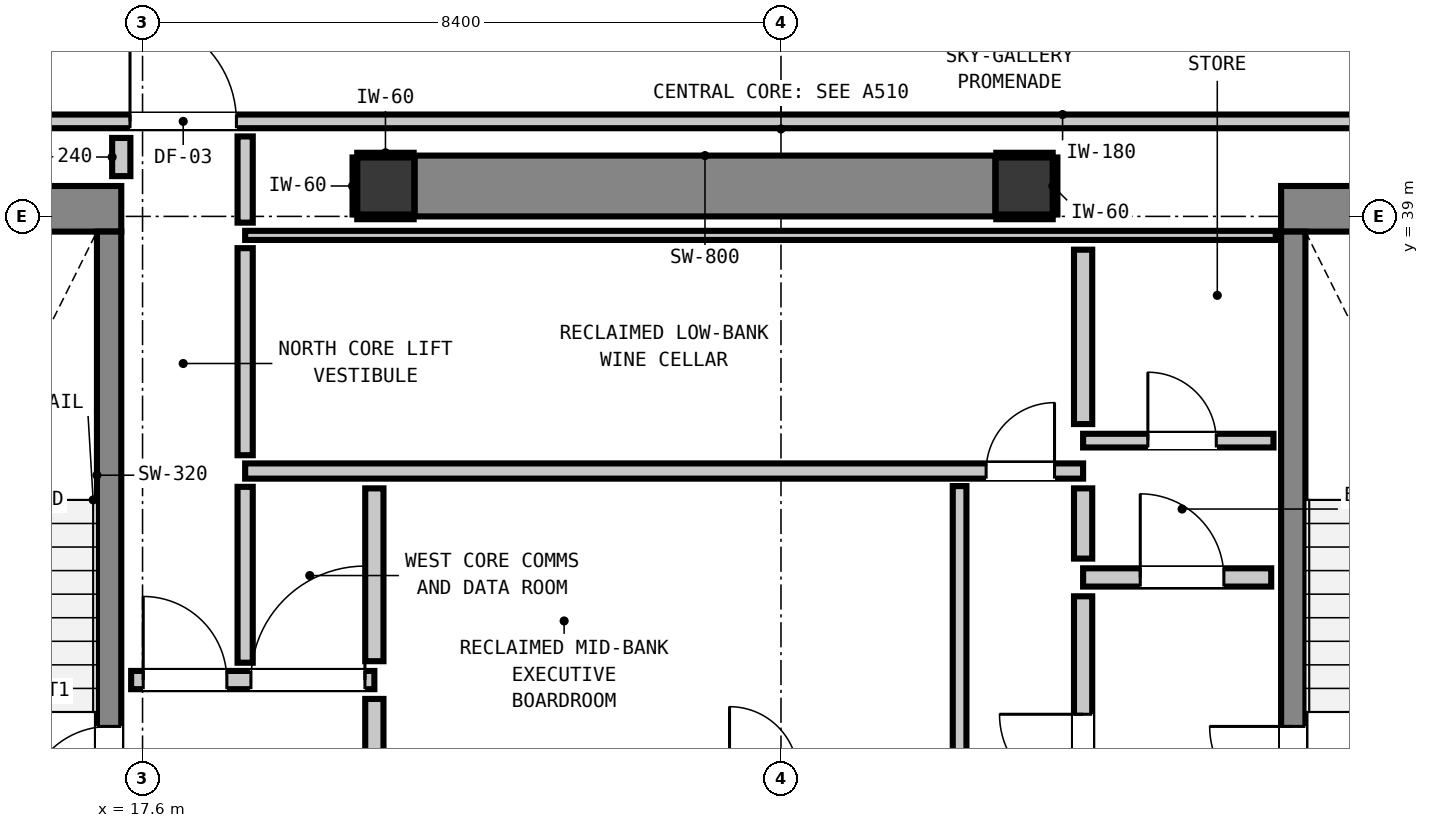
"""IFC4 building model, lengths in metres.
Left out: names, types, materials, properties, quantities, classifications, styles, units other than length and angle.
Written with IfcOpenShell. Run it as: python <this file> out.ifc"""

import sys

from ifc_helpers import new_model, si_unit, direction, frame, frame_2d, origin, origin_2d, place, context, subcontext, project, spatial, rectangle, extrude, element, fill, save


model = new_model("IFC4")
c1 = context("Model", 3, precision=1e-05, world=origin(), true_north=direction((0.0, 1.0)))
c2 = subcontext(c1, "Body", "Model", "MODEL_VIEW")
j1 = project(units=[si_unit("LENGTHUNIT", "METRE"), si_unit("PLANEANGLEUNIT", "RADIAN")], contexts=[c1])
p1 = place(None, origin())
s1 = spatial("IfcSite", under=j1, at=p1, CompositionType="ELEMENT")
p2 = place(p1, origin())
s2 = spatial("IfcBuilding", under=s1, at=p2, CompositionType="ELEMENT")
p3 = place(p2, frame((0.0, 0.0, 231.28)))
s3 = spatial("IfcBuildingStorey", under=s2, at=p3, CompositionType="ELEMENT", Elevation=231.28)
for number, where, z_axis, x_axis in (
    (1, (20.8, 39.4, 0.0), (0.0, 0.0, 1.0), (1.0, 0.0, 0.0)),
    (2, (29.2, 39.4, 0.0), (0.0, 0.0, 1.0), (1.0, 0.0, 0.0)),
):
    element("IfcColumn", number, at=place(p3, frame(where, z_axis=z_axis, x_axis=x_axis)), inside=s3, PredefinedType="COLUMN", context=c2, shape_type="SweptSolid", body=[
        extrude(rectangle(XDim=0.75, YDim=0.75, at=origin_2d()), origin(), (0.0, 0.0, 1.0), 3.32),
    ])
p4 = place(p3, frame((13.24, 39.1, 0.0), z_axis=(0.0, 0.0, 1.0), x_axis=(1.0, 0.0, 0.0)))
e3 = element("IfcWall", 3, at=p4, inside=s3, PredefinedType="SHEAR", context=c2, shape_type="SweptSolid", body=[
    extrude(rectangle(XDim=4.08, YDim=0.6, at=frame_2d((2.04, 0.0))), origin(), (0.0, 0.0, 1.0), 3.32),
])
p5 = place(p3, frame((32.58, 39.1, 0.0), z_axis=(0.0, 0.0, 1.0), x_axis=(1.0, 0.0, 0.0)))
e4 = element("IfcWall", 4, at=p5, inside=s3, PredefinedType="SHEAR", context=c2, shape_type="SweptSolid", body=[
    extrude(rectangle(XDim=4.08, YDim=0.6, at=frame_2d((2.04, 0.0))), origin(), (0.0, 0.0, 1.0), 3.32),
])
p6 = place(p3, frame((21.18, 39.4, 0.0), z_axis=(0.0, 0.0, 1.0), x_axis=(1.0, 0.0, 0.0)))
e5 = element("IfcWall", 5, at=p6, inside=s3, PredefinedType="SHEAR", context=c2, shape_type="SweptSolid", body=[
    extrude(rectangle(XDim=7.64, YDim=0.8, at=frame_2d((3.82, 0.0))), origin(), (0.0, 0.0, 1.0), 3.32),
])
p7 = place(p3, frame((17.16, 31.0, 0.0), z_axis=(0.0, 0.0, 1.0), x_axis=(0.0, 1.0, 0.0)))
e6 = element("IfcWall", 6, at=p7, inside=s3, PredefinedType="SHEAR", context=c2, shape_type="SweptSolid", body=[
    extrude(rectangle(XDim=7.8, YDim=0.32, at=frame_2d((3.9, 0.0))), origin(), (0.0, 0.0, 1.0), 3.32),
])
p8 = place(p7, frame((0.19, 0.0, 0.0)))
e7 = element("IfcOpeningElement", 7, at=p8, cuts=e6, PredefinedType="OPENING", context=c2, shape_type="SweptSolid", body=[
    extrude(rectangle(XDim=1.1, YDim=2.15, at=frame_2d((0.55, 1.075))), frame((0.0, 0.17, 0.0), z_axis=(0.0, -1.0, 0.0), x_axis=(1.0, 0.0, 0.0)), (0.0, 0.0, 1.0), 0.34),
])
p9 = place(p3, frame((32.74, 31.0, 0.0), z_axis=(0.0, 0.0, 1.0), x_axis=(0.0, 1.0, 0.0)))
e8 = element("IfcWall", 8, at=p9, inside=s3, PredefinedType="SHEAR", context=c2, shape_type="SweptSolid", body=[
    extrude(rectangle(XDim=7.8, YDim=0.32, at=frame_2d((3.9, 0.0))), origin(), (0.0, 0.0, 1.0), 3.32),
])
p10 = place(p9, frame((0.19, 0.0, 0.0)))
e9 = element("IfcOpeningElement", 9, at=p10, cuts=e8, PredefinedType="OPENING", context=c2, shape_type="SweptSolid", body=[
    extrude(rectangle(XDim=1.1, YDim=2.15, at=frame_2d((0.55, 1.075))), frame((0.0, 0.17, 0.0), z_axis=(0.0, -1.0, 0.0), x_axis=(1.0, 0.0, 0.0)), (0.0, 0.0, 1.0), 0.34),
])
p11 = place(p3, frame((17.45, 32.9, 0.0), z_axis=(0.0, 0.0, 1.0), x_axis=(1.0, 0.0, 0.0)))
e10 = element("IfcWall", 10, at=p11, inside=s3, PredefinedType="PARTITIONING", context=c2, shape_type="SweptSolid", body=[
    extrude(rectangle(XDim=3.2, YDim=0.24, at=frame_2d((1.6, 0.0))), origin(), (0.0, 0.0, 1.0), 3.1),
])
p12 = place(p11, frame((0.159, 0.0, 0.0)))
e11 = element("IfcOpeningElement", 11, at=p12, cuts=e10, PredefinedType="OPENING", context=c2, shape_type="SweptSolid", body=[
    extrude(rectangle(XDim=1.1, YDim=2.15, at=frame_2d((0.55, 1.075))), frame((0.0, 0.13, 0.0), z_axis=(0.0, -1.0, 0.0), x_axis=(1.0, 0.0, 0.0)), (0.0, 0.0, 1.0), 0.26),
])
p13 = place(p11, frame((1.576, 0.0, 0.0)))
e12 = element("IfcOpeningElement", 12, at=p13, cuts=e10, PredefinedType="OPENING", context=c2, shape_type="SweptSolid", body=[
    extrude(rectangle(XDim=1.5, YDim=2.15, at=frame_2d((0.75, 1.075))), frame((0.0, 0.13, 0.0), z_axis=(0.0, -1.0, 0.0), x_axis=(1.0, 0.0, 0.0)), (0.0, 0.0, 1.0), 0.26),
])
p14 = place(p3, frame((29.975, 34.25, 0.0), z_axis=(0.0, 0.0, 1.0), x_axis=(1.0, 0.0, 0.0)))
e13 = element("IfcWall", 13, at=p14, inside=s3, PredefinedType="PARTITIONING", context=c2, shape_type="SweptSolid", body=[
    extrude(rectangle(XDim=2.475, YDim=0.24, at=frame_2d((1.237, 0.0))), origin(), (0.0, 0.0, 1.0), 3.1),
])
p15 = place(p14, frame((0.752, 0.0, 0.0)))
e14 = element("IfcOpeningElement", 14, at=p15, cuts=e13, PredefinedType="OPENING", context=c2, shape_type="SweptSolid", body=[
    extrude(rectangle(XDim=1.1, YDim=2.15, at=frame_2d((0.55, 1.075))), frame((0.0, 0.13, 0.0), z_axis=(0.0, -1.0, 0.0), x_axis=(1.0, 0.0, 0.0)), (0.0, 0.0, 1.0), 0.26),
])
p16 = place(p3, frame((18.95, 35.65, 0.0), z_axis=(0.0, 0.0, 1.0), x_axis=(1.0, 0.0, 0.0)))
e15 = element("IfcWall", 15, at=p16, inside=s3, PredefinedType="PARTITIONING", context=c2, shape_type="SweptSolid", body=[
    extrude(rectangle(XDim=11.025, YDim=0.2, at=frame_2d((5.513, 0.0))), origin(), (0.0, 0.0, 1.0), 3.1),
])
p17 = place(p16, frame((9.749, 0.0, 0.0)))
e16 = element("IfcOpeningElement", 16, at=p17, cuts=e15, PredefinedType="OPENING", context=c2, shape_type="SweptSolid", body=[
    extrude(rectangle(XDim=0.9, YDim=2.1, at=frame_2d((0.45, 1.05))), frame((0.0, 0.11, 0.0), z_axis=(0.0, -1.0, 0.0), x_axis=(1.0, 0.0, 0.0)), (0.0, 0.0, 1.0), 0.22),
])
p18 = place(p3, frame((29.975, 36.05, 0.0), z_axis=(0.0, 0.0, 1.0), x_axis=(1.0, 0.0, 0.0)))
e17 = element("IfcWall", 17, at=p18, inside=s3, PredefinedType="PARTITIONING", context=c2, shape_type="SweptSolid", body=[
    extrude(rectangle(XDim=2.505, YDim=0.18, at=frame_2d((1.252, 0.0))), origin(), (0.0, 0.0, 1.0), 3.1),
])
p19 = place(p18, frame((0.852, 0.0, 0.0)))
e18 = element("IfcOpeningElement", 18, at=p19, cuts=e17, PredefinedType="OPENING", context=c2, shape_type="SweptSolid", body=[
    extrude(rectangle(XDim=0.9, YDim=2.1, at=frame_2d((0.45, 1.05))), frame((0.0, 0.1, 0.0), z_axis=(0.0, -1.0, 0.0), x_axis=(1.0, 0.0, 0.0)), (0.0, 0.0, 1.0), 0.2),
])
p20 = place(p3, frame((10.787, 40.25, 0.0), z_axis=(0.0, 0.0, 1.0), x_axis=(1.0, 0.0, 0.0)))
e19 = element("IfcWall", 19, at=p20, inside=s3, PredefinedType="PARTITIONING", context=c2, shape_type="SweptSolid", body=[
    extrude(rectangle(XDim=36.626, YDim=0.18, at=frame_2d((18.313, 0.0))), origin(), (0.0, 0.0, 1.0), 3.1),
])
p21 = place(p20, frame((6.648, 0.0, 0.0)))
e20 = element("IfcOpeningElement", 20, at=p21, cuts=e19, PredefinedType="OPENING", context=c2, shape_type="SweptSolid", body=[
    extrude(rectangle(XDim=1.4, YDim=2.15, at=frame_2d((0.7, 1.075))), frame((0.0, 0.1, 0.0), z_axis=(0.0, -1.0, 0.0), x_axis=(1.0, 0.0, 0.0)), (0.0, 0.0, 1.0), 0.2),
])
p22 = place(p20, frame((29.788, 0.0, 0.0)))
e21 = element("IfcOpeningElement", 21, at=p22, cuts=e19, PredefinedType="OPENING", context=c2, shape_type="SweptSolid", body=[
    extrude(rectangle(XDim=1.0, YDim=2.15, at=frame_2d((0.5, 1.075))), frame((0.0, 0.1, 0.0), z_axis=(0.0, -1.0, 0.0), x_axis=(1.0, 0.0, 0.0)), (0.0, 0.0, 1.0), 0.2),
])
p23 = place(p3, frame((18.95, 38.75, 0.0), z_axis=(0.0, 0.0, 1.0), x_axis=(1.0, 0.0, 0.0)))
e22 = element("IfcWall", 22, at=p23, inside=s3, PredefinedType="PARTITIONING", context=c2, shape_type="SweptSolid", body=[
    extrude(rectangle(XDim=13.56, YDim=0.12, at=frame_2d((6.78, 0.0))), origin(), (0.0, 0.0, 1.0), 3.1),
])
p24 = place(p3, frame((17.32, 39.53, 0.0), z_axis=(0.0, 0.0, 1.0), x_axis=(0.0, 1.0, 0.0)))
e23 = element("IfcWall", 23, at=p24, inside=s3, PredefinedType="PARTITIONING", context=c2, shape_type="SweptSolid", body=[
    extrude(rectangle(XDim=0.502, YDim=0.24, at=frame_2d((0.251, 0.0))), origin(), (0.0, 0.0, 1.0), 3.1),
])
p25 = place(p3, frame((20.65, 31.868, 0.0), z_axis=(0.0, 0.0, 1.0), x_axis=(0.0, 1.0, 0.0)))
e24 = element("IfcWall", 24, at=p25, inside=s3, PredefinedType="PARTITIONING", context=c2, shape_type="SweptSolid", body=[
    extrude(rectangle(XDim=0.784, YDim=0.24, at=frame_2d((0.392, 0.0))), origin(), (0.0, 0.0, 1.0), 2.335),
])
p26 = place(p3, frame((20.65, 33.148, 0.0), z_axis=(0.0, 0.0, 1.0), x_axis=(0.0, 1.0, 0.0)))
e25 = element("IfcWall", 25, at=p26, inside=s3, PredefinedType="PARTITIONING", context=c2, shape_type="SweptSolid", body=[
    extrude(rectangle(XDim=2.274, YDim=0.24, at=frame_2d((1.137, 0.0))), origin(), (0.0, 0.0, 1.0), 2.335),
])
p27 = place(p3, frame((29.975, 29.768, 0.0), z_axis=(0.0, 0.0, 1.0), x_axis=(0.0, 1.0, 0.0)))
e26 = element("IfcWall", 26, at=p27, inside=s3, PredefinedType="PARTITIONING", context=c2, shape_type="SweptSolid", body=[
    extrude(rectangle(XDim=4.234, YDim=0.24, at=frame_2d((2.117, 0.0))), origin(), (0.0, 0.0, 1.0), 3.1),
])
p28 = place(p27, frame((1.582, 0.0, 0.0)))
e27 = element("IfcOpeningElement", 27, at=p28, cuts=e26, PredefinedType="OPENING", context=c2, shape_type="SweptSolid", body=[
    extrude(rectangle(XDim=1.1, YDim=2.15, at=frame_2d((0.55, 1.075))), frame((0.0, 0.13, 0.0), z_axis=(0.0, -1.0, 0.0), x_axis=(1.0, 0.0, 0.0)), (0.0, 0.0, 1.0), 0.26),
])
p29 = place(p3, frame((29.975, 34.498, 0.0), z_axis=(0.0, 0.0, 1.0), x_axis=(0.0, 1.0, 0.0)))
e28 = element("IfcWall", 28, at=p29, inside=s3, PredefinedType="PARTITIONING", context=c2, shape_type="SweptSolid", body=[
    extrude(rectangle(XDim=0.924, YDim=0.24, at=frame_2d((0.462, 0.0))), origin(), (0.0, 0.0, 1.0), 3.1),
])
p30 = place(p3, frame((29.975, 36.268, 0.0), z_axis=(0.0, 0.0, 1.0), x_axis=(0.0, 1.0, 0.0)))
e29 = element("IfcWall", 29, at=p30, inside=s3, PredefinedType="PARTITIONING", context=c2, shape_type="SweptSolid", body=[
    extrude(rectangle(XDim=2.294, YDim=0.24, at=frame_2d((1.147, 0.0))), origin(), (0.0, 0.0, 1.0), 3.1),
])
p31 = place(p3, frame((18.95, 33.128, 0.0), z_axis=(0.0, 0.0, 1.0), x_axis=(0.0, 1.0, 0.0)))
e30 = element("IfcWall", 30, at=p31, inside=s3, PredefinedType="PARTITIONING", context=c2, shape_type="SweptSolid", body=[
    extrude(rectangle(XDim=2.314, YDim=0.2, at=frame_2d((1.157, 0.0))), origin(), (0.0, 0.0, 1.0), 3.1),
])
p32 = place(p3, frame((18.95, 35.858, 0.0), z_axis=(0.0, 0.0, 1.0), x_axis=(0.0, 1.0, 0.0)))
e31 = element("IfcWall", 31, at=p32, inside=s3, PredefinedType="PARTITIONING", context=c2, shape_type="SweptSolid", body=[
    extrude(rectangle(XDim=2.724, YDim=0.2, at=frame_2d((1.362, 0.0))), origin(), (0.0, 0.0, 1.0), 3.1),
])
p33 = place(p3, frame((18.95, 38.918, 0.0), z_axis=(0.0, 0.0, 1.0), x_axis=(0.0, 1.0, 0.0)))
e32 = element("IfcWall", 32, at=p33, inside=s3, PredefinedType="PARTITIONING", context=c2, shape_type="SweptSolid", body=[
    extrude(rectangle(XDim=1.134, YDim=0.2, at=frame_2d((0.567, 0.0))), origin(), (0.0, 0.0, 1.0), 3.1),
])
p34 = place(p3, frame((28.35, 31.838, 0.0), z_axis=(0.0, 0.0, 1.0), x_axis=(0.0, 1.0, 0.0)))
e33 = element("IfcWall", 33, at=p34, inside=s3, PredefinedType="PARTITIONING", context=c2, shape_type="SweptSolid", body=[
    extrude(rectangle(XDim=3.614, YDim=0.18, at=frame_2d((1.807, 0.0))), origin(), (0.0, 0.0, 1.0), 3.1),
])
for number, where, z_axis, x_axis in (
    (34, (20.425, 38.993, 0.0), (0.0, 0.0, 1.0), (1.0, 0.0, 0.0)),
    (35, (20.425, 39.807, 0.0), (0.0, 0.0, 1.0), (1.0, 0.0, 0.0)),
):
    element("IfcWall", number, at=place(p3, frame(where, z_axis=z_axis, x_axis=x_axis)), inside=s3, PredefinedType="PARTITIONING", context=c2, shape_type="SweptSolid", body=[
        extrude(rectangle(XDim=0.742, YDim=0.06, at=frame_2d((0.371, 0.0))), origin(), (0.0, 0.0, 1.0), 1.45),
    ])
p35 = place(p3, frame((20.393, 39.025, 0.0), z_axis=(0.0, 0.0, 1.0), x_axis=(0.0, 1.0, 0.0)))
e36 = element("IfcWall", 36, at=p35, inside=s3, PredefinedType="PARTITIONING", context=c2, shape_type="SweptSolid", body=[
    extrude(rectangle(XDim=0.75, YDim=0.06, at=frame_2d((0.375, 0.0))), origin(), (0.0, 0.0, 1.0), 1.45),
])
for number, where, z_axis, x_axis in (
    (37, (28.833, 38.993, 0.0), (0.0, 0.0, 1.0), (1.0, 0.0, 0.0)),
    (38, (28.833, 39.807, 0.0), (0.0, 0.0, 1.0), (1.0, 0.0, 0.0)),
):
    element("IfcWall", number, at=place(p3, frame(where, z_axis=z_axis, x_axis=x_axis)), inside=s3, PredefinedType="PARTITIONING", context=c2, shape_type="SweptSolid", body=[
        extrude(rectangle(XDim=0.742, YDim=0.06, at=frame_2d((0.371, 0.0))), origin(), (0.0, 0.0, 1.0), 1.45),
    ])
p36 = place(p3, frame((29.607, 39.025, 0.0), z_axis=(0.0, 0.0, 1.0), x_axis=(0.0, 1.0, 0.0)))
e39 = element("IfcWall", 39, at=p36, inside=s3, PredefinedType="PARTITIONING", context=c2, shape_type="SweptSolid", body=[
    extrude(rectangle(XDim=0.75, YDim=0.06, at=frame_2d((0.375, 0.0))), origin(), (0.0, 0.0, 1.0), 1.45),
])
p37 = place(p8, origin())
e40 = element("IfcDoor", 40, at=p37, inside=s3, OperationType="SINGLE_SWING_LEFT", PredefinedType="DOOR", context=c2, shape_type="SweptSolid", body=[
    extrude(rectangle(XDim=1.1, YDim=2.15, at=frame_2d((0.55, 1.075))), frame((0.0, 0.025, 0.0), z_axis=(0.0, -1.0, 0.0), x_axis=(1.0, 0.0, 0.0)), (0.0, 0.0, 1.0), 0.05),
])
fill(e7, e40)
p38 = place(p10, origin())
e41 = element("IfcDoor", 41, at=p38, inside=s3, OperationType="SINGLE_SWING_RIGHT", PredefinedType="DOOR", context=c2, shape_type="SweptSolid", body=[
    extrude(rectangle(XDim=1.1, YDim=2.15, at=frame_2d((0.55, 1.075))), frame((0.0, 0.025, 0.0), z_axis=(0.0, -1.0, 0.0), x_axis=(1.0, 0.0, 0.0)), (0.0, 0.0, 1.0), 0.05),
])
fill(e9, e41)
p39 = place(p12, origin())
e42 = element("IfcDoor", 42, at=p39, inside=s3, OperationType="SINGLE_SWING_LEFT", PredefinedType="DOOR", context=c2, shape_type="SweptSolid", body=[
    extrude(rectangle(XDim=1.1, YDim=2.15, at=frame_2d((0.55, 1.075))), frame((0.0, 0.025, 0.0), z_axis=(0.0, -1.0, 0.0), x_axis=(1.0, 0.0, 0.0)), (0.0, 0.0, 1.0), 0.05),
])
fill(e11, e42)
p40 = place(p28, origin())
e43 = element("IfcDoor", 43, at=p40, inside=s3, OperationType="SINGLE_SWING_RIGHT", PredefinedType="DOOR", context=c2, shape_type="SweptSolid", body=[
    extrude(rectangle(XDim=1.1, YDim=2.15, at=frame_2d((0.55, 1.075))), frame((0.0, 0.025, 0.0), z_axis=(0.0, -1.0, 0.0), x_axis=(1.0, 0.0, 0.0)), (0.0, 0.0, 1.0), 0.05),
])
fill(e27, e43)
p41 = place(p15, origin())
e44 = element("IfcDoor", 44, at=p41, inside=s3, OperationType="SINGLE_SWING_LEFT", PredefinedType="DOOR", context=c2, shape_type="SweptSolid", body=[
    extrude(rectangle(XDim=1.1, YDim=2.15, at=frame_2d((0.55, 1.075))), frame((0.0, 0.025, 0.0), z_axis=(0.0, -1.0, 0.0), x_axis=(1.0, 0.0, 0.0)), (0.0, 0.0, 1.0), 0.05),
])
fill(e14, e44)
p42 = place(p21, origin())
e45 = element("IfcDoor", 45, at=p42, inside=s3, OperationType="SINGLE_SWING_LEFT", PredefinedType="DOOR", context=c2, shape_type="SweptSolid", body=[
    extrude(rectangle(XDim=1.4, YDim=2.15, at=frame_2d((0.7, 1.075))), frame((0.0, 0.025, 0.0), z_axis=(0.0, -1.0, 0.0), x_axis=(1.0, 0.0, 0.0)), (0.0, 0.0, 1.0), 0.05),
])
fill(e20, e45)
p43 = place(p13, origin())
e46 = element("IfcDoor", 46, at=p43, inside=s3, OperationType="SINGLE_SWING_RIGHT", PredefinedType="DOOR", context=c2, shape_type="SweptSolid", body=[
    extrude(rectangle(XDim=1.5, YDim=2.15, at=frame_2d((0.75, 1.075))), frame((0.0, 0.025, 0.0), z_axis=(0.0, -1.0, 0.0), x_axis=(1.0, 0.0, 0.0)), (0.0, 0.0, 1.0), 0.05),
])
fill(e12, e46)
p44 = place(p19, origin())
e47 = element("IfcDoor", 47, at=p44, inside=s3, OperationType="SINGLE_SWING_LEFT", PredefinedType="DOOR", context=c2, shape_type="SweptSolid", body=[
    extrude(rectangle(XDim=0.9, YDim=2.1, at=frame_2d((0.45, 1.05))), frame((0.0, 0.025, 0.0), z_axis=(0.0, -1.0, 0.0), x_axis=(1.0, 0.0, 0.0)), (0.0, 0.0, 1.0), 0.05),
])
fill(e18, e47)
p45 = place(p17, origin())
e48 = element("IfcDoor", 48, at=p45, inside=s3, OperationType="SINGLE_SWING_RIGHT", PredefinedType="DOOR", context=c2, shape_type="SweptSolid", body=[
    extrude(rectangle(XDim=0.9, YDim=2.1, at=frame_2d((0.45, 1.05))), frame((0.0, 0.025, 0.0), z_axis=(0.0, -1.0, 0.0), x_axis=(1.0, 0.0, 0.0)), (0.0, 0.0, 1.0), 0.05),
])
fill(e16, e48)
save(model, sys.argv[1])
